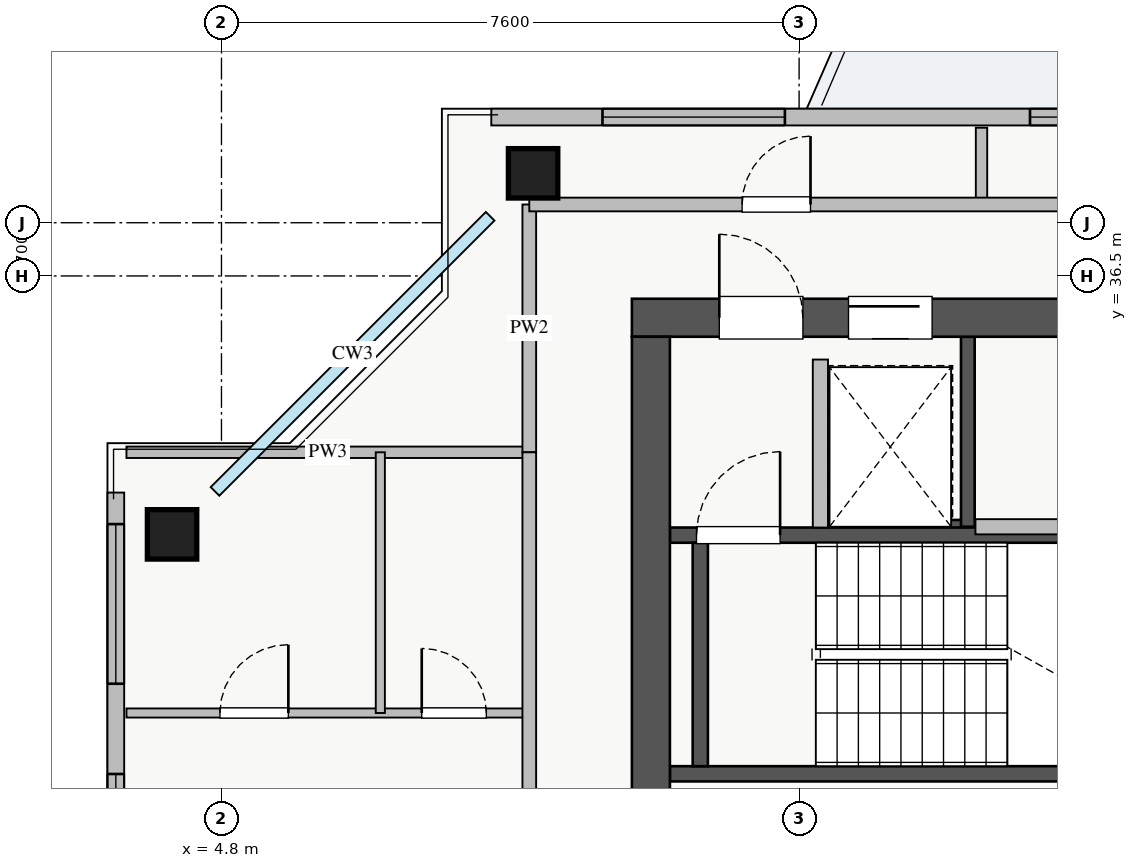
"""IFC4 building model, lengths in metres.
Left out: names, types, materials, properties, quantities, classifications, styles, units other than length and angle.
Written with IfcOpenShell. Run it as: python <this file> out.ifc"""

import sys

from ifc_helpers import new_model, si_unit, direction, frame, frame_2d, origin, origin_2d, place, context, subcontext, project, spatial, rectangle, extrude, source, transform, mapped, element, fill, save


model = new_model("IFC4")
c1 = context("Model", 3, precision=1e-05, world=origin(), true_north=direction((0.0, 1.0)))
c2 = subcontext(c1, "Body", "Model", "MODEL_VIEW")
j1 = project(units=[si_unit("LENGTHUNIT", "METRE"), si_unit("PLANEANGLEUNIT", "RADIAN")], contexts=[c1])
p1 = place(None, origin())
s1 = spatial("IfcSite", under=j1, at=p1, CompositionType="ELEMENT")
p2 = place(p1, origin())
s2 = spatial("IfcBuilding", under=s1, at=p2, CompositionType="ELEMENT")
p3 = place(p2, frame((0.0, 0.0, 256.75)))
s3 = spatial("IfcBuildingStorey", under=s2, at=p3, CompositionType="ELEMENT", Elevation=256.75)
p4 = place(p3, frame((12.68, 33.2, 0.0), z_axis=(0.0, 0.0, 1.0), x_axis=(1.0, 0.0, 0.0)))
e1 = element("IfcWall", 1, at=p4, inside=s3, PredefinedType="SHEAR", context=c2, shape_type="SweptSolid", body=[
    extrude(rectangle(XDim=1.94, YDim=0.18, at=frame_2d((0.97, 0.0))), origin(), (0.0, 0.0, 1.0), 3.07),
])
p5 = place(p3, frame((14.62, 33.2, 0.0), z_axis=(0.0, 0.0, 1.0), x_axis=(0.0, 1.0, 0.0)))
e2 = element("IfcWall", 2, at=p5, inside=s3, PredefinedType="SHEAR", context=c2, shape_type="SweptSolid", body=[
    extrude(rectangle(XDim=2.5, YDim=0.18, at=frame_2d((1.25, 0.0))), origin(), (0.0, 0.0, 1.0), 3.07),
])
p6 = place(p3, frame((10.7, 29.95, 0.0), z_axis=(0.0, 0.0, 1.0), x_axis=(1.0, 0.0, 0.0)))
e3 = element("IfcWall", 3, at=p6, inside=s3, PredefinedType="SHEAR", context=c2, shape_type="SweptSolid", body=[
    extrude(rectangle(XDim=7.45, YDim=0.2, at=frame_2d((3.725, 0.0))), origin(), (0.0, 0.0, 1.0), 3.25),
])
p7 = place(p3, frame((10.7, 33.09, 0.0), z_axis=(0.0, 0.0, 1.0), x_axis=(1.0, 0.0, 0.0)))
e4 = element("IfcWall", 4, at=p7, inside=s3, PredefinedType="SHEAR", context=c2, shape_type="SweptSolid", body=[
    extrude(rectangle(XDim=7.45, YDim=0.2, at=frame_2d((3.725, 0.0))), origin(), (0.0, 0.0, 1.0), 3.25),
])
p8 = place(p7, frame((0.35, 0.0, 0.0)))
e5 = element("IfcOpeningElement", 5, at=p8, cuts=e4, PredefinedType="OPENING", context=c2, shape_type="SweptSolid", body=[
    extrude(rectangle(XDim=1.1, YDim=2.05, at=frame_2d((0.55, 1.025))), frame((0.0, 0.11, 0.0), z_axis=(0.0, -1.0, 0.0), x_axis=(1.0, 0.0, 0.0)), (0.0, 0.0, 1.0), 0.22),
])
p9 = place(p3, frame((11.1, 30.05, 0.0), z_axis=(0.0, 0.0, 1.0), x_axis=(0.0, 1.0, 0.0)))
e6 = element("IfcWall", 6, at=p9, inside=s3, PredefinedType="SHEAR", context=c2, shape_type="SweptSolid", body=[
    extrude(rectangle(XDim=2.94, YDim=0.2, at=frame_2d((1.47, 0.0))), origin(), (0.0, 0.0, 1.0), 3.25),
])
p10 = place(p3, frame((10.2, 35.95, 0.0), z_axis=(0.0, 0.0, 1.0), x_axis=(1.0, 0.0, 0.0)))
e7 = element("IfcWall", 7, at=p10, inside=s3, PredefinedType="SHEAR", context=c2, shape_type="SweptSolid", body=[
    extrude(rectangle(XDim=17.6, YDim=0.5, at=frame_2d((8.8, 0.0))), origin(), (0.0, 0.0, 1.0), 3.25),
])
p11 = place(p10, frame((1.15, 0.0, 0.0)))
e8 = element("IfcOpeningElement", 8, at=p11, cuts=e7, PredefinedType="OPENING", context=c2, shape_type="SweptSolid", body=[
    extrude(rectangle(XDim=1.1, YDim=2.05, at=frame_2d((0.55, 1.025))), frame((0.0, 0.26, 0.0), z_axis=(0.0, -1.0, 0.0), x_axis=(1.0, 0.0, 0.0)), (0.0, 0.0, 1.0), 0.52),
])
p12 = place(p10, frame((8.3, 0.0, 0.0)))
e9 = element("IfcOpeningElement", 9, at=p12, cuts=e7, PredefinedType="OPENING", context=c2, shape_type="SweptSolid", body=[
    extrude(rectangle(XDim=1.1, YDim=2.05, at=frame_2d((0.55, 1.025))), frame((0.0, 0.26, 0.0), z_axis=(0.0, -1.0, 0.0), x_axis=(1.0, 0.0, 0.0)), (0.0, 0.0, 1.0), 0.52),
])
p13 = place(p10, frame((2.85, 0.0, 0.0)))
e10 = element("IfcOpeningElement", 10, at=p13, cuts=e7, PredefinedType="OPENING", context=c2, shape_type="SweptSolid", body=[
    extrude(rectangle(XDim=1.1, YDim=2.05, at=frame_2d((0.55, 1.025))), frame((0.0, 0.26, 0.0), z_axis=(0.0, -1.0, 0.0), x_axis=(1.0, 0.0, 0.0)), (0.0, 0.0, 1.0), 0.52),
])
p14 = place(p10, frame((5.8, 0.0, 0.0)))
e11 = element("IfcOpeningElement", 11, at=p14, cuts=e7, PredefinedType="OPENING", context=c2, shape_type="SweptSolid", body=[
    extrude(rectangle(XDim=1.0, YDim=2.05, at=frame_2d((0.5, 1.025))), frame((0.0, 0.26, 0.0), z_axis=(0.0, -1.0, 0.0), x_axis=(1.0, 0.0, 0.0)), (0.0, 0.0, 1.0), 0.52),
])
p15 = place(p10, frame((14.74, 0.0, 0.0)))
e12 = element("IfcOpeningElement", 12, at=p15, cuts=e7, PredefinedType="OPENING", context=c2, shape_type="SweptSolid", body=[
    extrude(rectangle(XDim=1.0, YDim=2.05, at=frame_2d((0.5, 1.025))), frame((0.0, 0.26, 0.0), z_axis=(0.0, -1.0, 0.0), x_axis=(1.0, 0.0, 0.0)), (0.0, 0.0, 1.0), 0.52),
])
p16 = place(p10, frame((10.175, 0.0, 0.0)))
e13 = element("IfcOpeningElement", 13, at=p16, cuts=e7, PredefinedType="OPENING", context=c2, shape_type="SweptSolid", body=[
    extrude(rectangle(XDim=1.0, YDim=2.05, at=frame_2d((0.5, 1.025))), frame((0.0, 0.26, 0.0), z_axis=(0.0, -1.0, 0.0), x_axis=(1.0, 0.0, 0.0)), (0.0, 0.0, 1.0), 0.52),
])
p17 = place(p10, frame((12.625, 0.0, 0.0)))
e14 = element("IfcOpeningElement", 14, at=p17, cuts=e7, PredefinedType="OPENING", context=c2, shape_type="SweptSolid", body=[
    extrude(rectangle(XDim=1.0, YDim=2.05, at=frame_2d((0.5, 1.025))), frame((0.0, 0.26, 0.0), z_axis=(0.0, -1.0, 0.0), x_axis=(1.0, 0.0, 0.0)), (0.0, 0.0, 1.0), 0.52),
])
p18 = place(p3, frame((10.45, 29.5, 0.0), z_axis=(0.0, 0.0, 1.0), x_axis=(0.0, 1.0, 0.0)))
e15 = element("IfcWall", 15, at=p18, inside=s3, PredefinedType="SHEAR", context=c2, shape_type="SweptSolid", body=[
    extrude(rectangle(XDim=6.2, YDim=0.5, at=frame_2d((3.1, 0.0))), origin(), (0.0, 0.0, 1.0), 3.25),
])
m1 = source(origin(), c2, "Body", "SweptSolid", [
    extrude(rectangle(XDim=0.65, YDim=0.65, at=origin_2d()), origin(), (0.0, 0.0, 1.0), 3.25),
])
for number, where, z_axis, x_axis in (
    (16, (8.9, 37.85, 0.0), (0.0, 0.0, 1.0), (1.0, 0.0, 0.0)),
    (17, (4.15, 33.1, 0.0), (0.0, 0.0, 1.0), (1.0, 0.0, 0.0)),
):
    element("IfcColumn", number, at=place(p3, frame(where, z_axis=z_axis, x_axis=x_axis)), inside=s3, PredefinedType="COLUMN", context=c2, shape_type="MappedRepresentation", body=[
        mapped(m1, transform((0.0, 0.0, 0.0), x_axis=(1.0, 0.0, 0.0), y_axis=(0.0, 1.0, 0.0), z_axis=(0.0, 0.0, 1.0), scale=1.0)),
    ])
p19 = place(p3, frame((8.35, 38.59, 0.0), z_axis=(0.0, 0.0, 1.0), x_axis=(1.0, 0.0, 0.0)))
e18 = element("IfcWall", 18, at=p19, inside=s3, PredefinedType="STANDARD", context=c2, shape_type="SweptSolid", body=[
    extrude(rectangle(XDim=21.3, YDim=0.22, at=frame_2d((10.65, 0.0))), origin(), (0.0, 0.0, 1.0), 2.61),
])
p20 = place(p19, frame((11.5, 0.0, 0.0)))
e19 = element("IfcOpeningElement", 19, at=p20, cuts=e18, PredefinedType="OPENING", context=c2, shape_type="SweptSolid", body=[
    extrude(rectangle(XDim=1.2, YDim=2.1, at=frame_2d((0.6, 1.05))), frame((0.0, 0.12, 0.0), z_axis=(0.0, -1.0, 0.0), x_axis=(1.0, 0.0, 0.0)), (0.0, 0.0, 1.0), 0.24),
])
p21 = place(p19, frame((1.463, 0.0, 0.9)))
e20 = element("IfcOpeningElement", 20, at=p21, cuts=e18, PredefinedType="OPENING", context=c2, shape_type="SweptSolid", body=[
    extrude(rectangle(XDim=2.4, YDim=1.48, at=frame_2d((1.2, 0.74))), frame((0.0, 0.12, 0.0), z_axis=(0.0, -1.0, 0.0), x_axis=(1.0, 0.0, 0.0)), (0.0, 0.0, 1.0), 0.24),
])
p22 = place(p19, frame((7.088, 0.0, 0.9)))
e21 = element("IfcOpeningElement", 21, at=p22, cuts=e18, PredefinedType="OPENING", context=c2, shape_type="SweptSolid", body=[
    extrude(rectangle(XDim=1.8, YDim=1.45, at=frame_2d((0.9, 0.725))), frame((0.0, 0.12, 0.0), z_axis=(0.0, -1.0, 0.0), x_axis=(1.0, 0.0, 0.0)), (0.0, 0.0, 1.0), 0.24),
])
p23 = place(p19, frame((19.775, 0.0, 0.9)))
e22 = element("IfcOpeningElement", 22, at=p23, cuts=e18, PredefinedType="OPENING", context=c2, shape_type="SweptSolid", body=[
    extrude(rectangle(XDim=1.2, YDim=1.4, at=frame_2d((0.6, 0.7))), frame((0.0, 0.12, 0.0), z_axis=(0.0, -1.0, 0.0), x_axis=(1.0, 0.0, 0.0)), (0.0, 0.0, 1.0), 0.24),
])
p24 = place(p19, frame((15.042, 0.0, 0.9)))
e23 = element("IfcOpeningElement", 23, at=p24, cuts=e18, PredefinedType="OPENING", context=c2, shape_type="SweptSolid", body=[
    extrude(rectangle(XDim=2.4, YDim=1.5, at=frame_2d((1.2, 0.75))), frame((0.0, 0.12, 0.0), z_axis=(0.0, -1.0, 0.0), x_axis=(1.0, 0.0, 0.0)), (0.0, 0.0, 1.0), 0.24),
])
p25 = place(p3, frame((3.41, 12.35, 0.0), z_axis=(0.0, 0.0, 1.0), x_axis=(0.0, 1.0, 0.0)))
e24 = element("IfcWall", 24, at=p25, inside=s3, PredefinedType="STANDARD", context=c2, shape_type="SweptSolid", body=[
    extrude(rectangle(XDim=21.3, YDim=0.22, at=frame_2d((10.65, 0.0))), origin(), (0.0, 0.0, 1.0), 2.61),
])
p26 = place(p25, frame((11.5, 0.0, 0.0)))
e25 = element("IfcOpeningElement", 25, at=p26, cuts=e24, PredefinedType="OPENING", context=c2, shape_type="SweptSolid", body=[
    extrude(rectangle(XDim=1.2, YDim=2.1, at=frame_2d((0.6, 1.05))), frame((0.0, 0.12, 0.0), z_axis=(0.0, -1.0, 0.0), x_axis=(1.0, 0.0, 0.0)), (0.0, 0.0, 1.0), 0.24),
])
p27 = place(p25, frame((0.44, 0.0, 0.9)))
e26 = element("IfcOpeningElement", 26, at=p27, cuts=e24, PredefinedType="OPENING", context=c2, shape_type="SweptSolid", body=[
    extrude(rectangle(XDim=2.4, YDim=1.5, at=frame_2d((1.2, 0.75))), frame((0.0, 0.12, 0.0), z_axis=(0.0, -1.0, 0.0), x_axis=(1.0, 0.0, 0.0)), (0.0, 0.0, 1.0), 0.24),
])
p28 = place(p25, frame((18.785, 0.0, 0.9)))
e27 = element("IfcOpeningElement", 27, at=p28, cuts=e24, PredefinedType="OPENING", context=c2, shape_type="SweptSolid", body=[
    extrude(rectangle(XDim=2.1, YDim=1.5, at=frame_2d((1.05, 0.75))), frame((0.0, 0.12, 0.0), z_axis=(0.0, -1.0, 0.0), x_axis=(1.0, 0.0, 0.0)), (0.0, 0.0, 1.0), 0.24),
])
p29 = place(p25, frame((3.653, 0.0, 0.9)))
e28 = element("IfcOpeningElement", 28, at=p29, cuts=e24, PredefinedType="OPENING", context=c2, shape_type="SweptSolid", body=[
    extrude(rectangle(XDim=2.4, YDim=1.5, at=frame_2d((1.2, 0.75))), frame((0.0, 0.12, 0.0), z_axis=(0.0, -1.0, 0.0), x_axis=(1.0, 0.0, 0.0)), (0.0, 0.0, 1.0), 0.24),
])
p30 = place(p25, frame((15.198, 0.0, 0.9)))
e29 = element("IfcOpeningElement", 29, at=p30, cuts=e24, PredefinedType="OPENING", context=c2, shape_type="SweptSolid", body=[
    extrude(rectangle(XDim=2.4, YDim=1.5, at=frame_2d((1.2, 0.75))), frame((0.0, 0.12, 0.0), z_axis=(0.0, -1.0, 0.0), x_axis=(1.0, 0.0, 0.0)), (0.0, 0.0, 1.0), 0.24),
])
p31 = place(p25, frame((6.705, 0.0, 0.9)))
e30 = element("IfcOpeningElement", 30, at=p31, cuts=e24, PredefinedType="OPENING", context=c2, shape_type="SweptSolid", body=[
    extrude(rectangle(XDim=0.9, YDim=1.2, at=frame_2d((0.45, 0.6))), frame((0.0, 0.12, 0.0), z_axis=(0.0, -1.0, 0.0), x_axis=(1.0, 0.0, 0.0)), (0.0, 0.0, 1.0), 0.24),
])
p32 = place(p3, frame((12.68, 33.19, 0.0), z_axis=(0.0, 0.0, 1.0), x_axis=(0.0, 1.0, 0.0)))
e31 = element("IfcWall", 31, at=p32, inside=s3, PredefinedType="PARTITIONING", context=c2, shape_type="SweptSolid", body=[
    extrude(rectangle(XDim=2.21, YDim=0.2, at=frame_2d((1.105, 0.0))), origin(), (0.0, 0.0, 1.0), 3.07),
])
p33 = place(p3, frame((14.72, 33.2, 0.0), z_axis=(0.0, 0.0, 1.0), x_axis=(1.0, 0.0, 0.0)))
e32 = element("IfcWall", 32, at=p33, inside=s3, PredefinedType="PARTITIONING", context=c2, shape_type="SweptSolid", body=[
    extrude(rectangle(XDim=3.28, YDim=0.2, at=frame_2d((1.64, 0.0))), origin(), (0.0, 0.0, 1.0), 3.07),
])
p34 = place(p3, frame((3.55, 34.18, 0.0), z_axis=(0.0, 0.0, 1.0), x_axis=(1.0, 0.0, 0.0)))
e33 = element("IfcWall", 33, at=p34, inside=s3, PredefinedType="PARTITIONING", context=c2, shape_type="SweptSolid", body=[
    extrude(rectangle(XDim=5.3, YDim=0.15, at=frame_2d((2.65, 0.0))), origin(), (0.0, 0.0, 1.0), 3.07),
])
p35 = place(p3, frame((8.85, 34.18, 0.0), z_axis=(0.0, 0.0, 1.0), x_axis=(0.0, 1.0, 0.0)))
e34 = element("IfcWall", 34, at=p35, inside=s3, PredefinedType="PARTITIONING", context=c2, shape_type="SweptSolid", body=[
    extrude(rectangle(XDim=3.26, YDim=0.18, at=frame_2d((1.63, 0.0))), origin(), (0.0, 0.0, 1.0), 2.569),
])
p36 = place(p3, frame((14.8, 37.44, 0.0), z_axis=(0.0, 0.0, 1.0), x_axis=(0.0, 1.0, 0.0)))
e35 = element("IfcWall", 35, at=p36, inside=s3, PredefinedType="PARTITIONING", context=c2, shape_type="SweptSolid", body=[
    extrude(rectangle(XDim=1.01, YDim=0.15, at=frame_2d((0.505, 0.0))), origin(), (0.0, 0.0, 1.0), 3.07),
])
p37 = place(p3, frame((8.85, 37.44, 0.0), z_axis=(0.0, 0.0, 1.0), x_axis=(1.0, 0.0, 0.0)))
e36 = element("IfcWall", 36, at=p37, inside=s3, PredefinedType="PARTITIONING", context=c2, shape_type="SweptSolid", body=[
    extrude(rectangle(XDim=18.95, YDim=0.18, at=frame_2d((9.475, 0.0))), origin(), (0.0, 0.0, 1.0), 3.07),
])
p38 = place(p37, frame((2.8, 0.0, 0.0)))
e37 = element("IfcOpeningElement", 37, at=p38, cuts=e36, PredefinedType="OPENING", context=c2, shape_type="SweptSolid", body=[
    extrude(rectangle(XDim=0.9, YDim=2.05, at=frame_2d((0.45, 1.025))), frame((0.0, 0.1, 0.0), z_axis=(0.0, -1.0, 0.0), x_axis=(1.0, 0.0, 0.0)), (0.0, 0.0, 1.0), 0.2),
])
p39 = place(p37, frame((8.8, 0.0, 0.0)))
e38 = element("IfcOpeningElement", 38, at=p39, cuts=e36, PredefinedType="OPENING", context=c2, shape_type="SweptSolid", body=[
    extrude(rectangle(XDim=0.9, YDim=2.05, at=frame_2d((0.45, 1.025))), frame((0.0, 0.1, 0.0), z_axis=(0.0, -1.0, 0.0), x_axis=(1.0, 0.0, 0.0)), (0.0, 0.0, 1.0), 0.2),
])
p40 = place(p37, frame((15.2, 0.0, 0.0)))
e39 = element("IfcOpeningElement", 39, at=p40, cuts=e36, PredefinedType="OPENING", context=c2, shape_type="SweptSolid", body=[
    extrude(rectangle(XDim=0.9, YDim=2.05, at=frame_2d((0.45, 1.025))), frame((0.0, 0.1, 0.0), z_axis=(0.0, -1.0, 0.0), x_axis=(1.0, 0.0, 0.0)), (0.0, 0.0, 1.0), 0.2),
])
p41 = place(p3, frame((3.55, 30.75, 0.0), z_axis=(0.0, 0.0, 1.0), x_axis=(1.0, 0.0, 0.0)))
e40 = element("IfcWall", 40, at=p41, inside=s3, PredefinedType="PLUMBINGWALL", context=c2, shape_type="SweptSolid", body=[
    extrude(rectangle(XDim=5.3, YDim=0.12, at=frame_2d((2.65, 0.0))), origin(), (0.0, 0.0, 1.0), 3.07),
])
p42 = place(p41, frame((1.23, 0.0, 0.0)))
e41 = element("IfcOpeningElement", 41, at=p42, cuts=e40, PredefinedType="OPENING", context=c2, shape_type="SweptSolid", body=[
    extrude(rectangle(XDim=0.9, YDim=2.05, at=frame_2d((0.45, 1.025))), frame((0.0, 0.07, 0.0), z_axis=(0.0, -1.0, 0.0), x_axis=(1.0, 0.0, 0.0)), (0.0, 0.0, 1.0), 0.14),
])
p43 = place(p41, frame((3.885, 0.0, 0.0)))
e42 = element("IfcOpeningElement", 42, at=p43, cuts=e40, PredefinedType="OPENING", context=c2, shape_type="SweptSolid", body=[
    extrude(rectangle(XDim=0.85, YDim=2.05, at=frame_2d((0.425, 1.025))), frame((0.0, 0.07, 0.0), z_axis=(0.0, -1.0, 0.0), x_axis=(1.0, 0.0, 0.0)), (0.0, 0.0, 1.0), 0.14),
])
p44 = place(p3, frame((6.89, 30.75, 0.0), z_axis=(0.0, 0.0, 1.0), x_axis=(0.0, 1.0, 0.0)))
e43 = element("IfcWall", 43, at=p44, inside=s3, PredefinedType="PLUMBINGWALL", context=c2, shape_type="SweptSolid", body=[
    extrude(rectangle(XDim=3.43, YDim=0.12, at=frame_2d((1.715, 0.0))), origin(), (0.0, 0.0, 1.0), 3.07),
])
p45 = place(p3, frame((8.85, 11.82, 0.0), z_axis=(0.0, 0.0, 1.0), x_axis=(0.0, 1.0, 0.0)))
e44 = element("IfcWall", 44, at=p45, inside=s3, PredefinedType="PARTITIONING", context=c2, shape_type="SweptSolid", body=[
    extrude(rectangle(XDim=22.36, YDim=0.18, at=frame_2d((11.18, 0.0))), origin(), (0.0, 0.0, 1.0), 2.569),
])
p46 = place(p45, frame((1.2, 0.0, 0.0)))
e45 = element("IfcOpeningElement", 45, at=p46, cuts=e44, PredefinedType="OPENING", context=c2, shape_type="SweptSolid", body=[
    extrude(rectangle(XDim=1.0, YDim=2.05, at=frame_2d((0.5, 1.025))), frame((0.0, 0.1, 0.0), z_axis=(0.0, -1.0, 0.0), x_axis=(1.0, 0.0, 0.0)), (0.0, 0.0, 1.0), 0.2),
])
p47 = place(p45, frame((8.445, 0.0, 0.0)))
e46 = element("IfcOpeningElement", 46, at=p47, cuts=e44, PredefinedType="OPENING", context=c2, shape_type="SweptSolid", body=[
    extrude(rectangle(XDim=1.0, YDim=2.05, at=frame_2d((0.5, 1.025))), frame((0.0, 0.1, 0.0), z_axis=(0.0, -1.0, 0.0), x_axis=(1.0, 0.0, 0.0)), (0.0, 0.0, 1.0), 0.2),
])
p48 = place(p45, frame((16.23, 0.0, 0.0)))
e47 = element("IfcOpeningElement", 47, at=p48, cuts=e44, PredefinedType="OPENING", context=c2, shape_type="SweptSolid", body=[
    extrude(rectangle(XDim=1.0, YDim=2.05, at=frame_2d((0.5, 1.025))), frame((0.0, 0.1, 0.0), z_axis=(0.0, -1.0, 0.0), x_axis=(1.0, 0.0, 0.0)), (0.0, 0.0, 1.0), 0.2),
])
m2 = source(origin(), c2, "Body", "SweptSolid", [
    extrude(rectangle(XDim=2.4, YDim=1.48, at=frame_2d((1.2, 0.74))), frame((0.0, 0.03, 0.0), z_axis=(0.0, -1.0, 0.0), x_axis=(1.0, 0.0, 0.0)), (0.0, 0.0, 1.0), 0.06),
])
p49 = place(p21, origin())
e48 = element("IfcWindow", 48, at=p49, inside=s3, PartitioningType="TRIPLE_PANEL_VERTICAL", PredefinedType="WINDOW", context=c2, shape_type="MappedRepresentation", body=[
    mapped(m2, transform((0.0, 0.0, 0.0), x_axis=(1.0, 0.0, 0.0), y_axis=(0.0, 1.0, 0.0), z_axis=(0.0, 0.0, 1.0), scale=1.0)),
])
fill(e20, e48)
m3 = source(origin(), c2, "Body", "SweptSolid", [
    extrude(rectangle(XDim=1.8, YDim=1.45, at=frame_2d((0.9, 0.725))), frame((0.0, 0.03, 0.0), z_axis=(0.0, -1.0, 0.0), x_axis=(1.0, 0.0, 0.0)), (0.0, 0.0, 1.0), 0.06),
])
p50 = place(p22, origin())
e49 = element("IfcWindow", 49, at=p50, inside=s3, PartitioningType="DOUBLE_PANEL_VERTICAL", PredefinedType="WINDOW", context=c2, shape_type="MappedRepresentation", body=[
    mapped(m3, transform((0.0, 0.0, 0.0), x_axis=(1.0, 0.0, 0.0), y_axis=(0.0, 1.0, 0.0), z_axis=(0.0, 0.0, 1.0), scale=1.0)),
])
fill(e21, e49)
m4 = source(origin(), c2, "Body", "SweptSolid", [
    extrude(rectangle(XDim=2.1, YDim=1.5, at=frame_2d((1.05, 0.75))), frame((0.0, 0.03, 0.0), z_axis=(0.0, -1.0, 0.0), x_axis=(1.0, 0.0, 0.0)), (0.0, 0.0, 1.0), 0.06),
])
p51 = place(p28, origin())
e50 = element("IfcWindow", 50, at=p51, inside=s3, PartitioningType="TRIPLE_PANEL_VERTICAL", PredefinedType="WINDOW", context=c2, shape_type="MappedRepresentation", body=[
    mapped(m4, transform((0.0, 0.0, 0.0), x_axis=(1.0, 0.0, 0.0), y_axis=(0.0, 1.0, 0.0), z_axis=(0.0, 0.0, 1.0), scale=1.0)),
])
fill(e27, e50)
m5 = source(origin(), c2, "Body", "SweptSolid", [
    extrude(rectangle(XDim=1.1, YDim=2.05, at=frame_2d((0.55, 1.025))), frame((0.0, 0.025, 0.0), z_axis=(0.0, -1.0, 0.0), x_axis=(1.0, 0.0, 0.0)), (0.0, 0.0, 1.0), 0.05),
])
p52 = place(p11, origin())
e51 = element("IfcDoor", 51, at=p52, inside=s3, OperationType="SINGLE_SWING_LEFT", PredefinedType="DOOR", context=c2, shape_type="MappedRepresentation", body=[
    mapped(m5, transform((0.0, 0.0, 0.0), x_axis=(1.0, 0.0, 0.0), y_axis=(0.0, 1.0, 0.0), z_axis=(0.0, 0.0, 1.0), scale=1.0)),
])
fill(e8, e51)
p53 = place(p8, origin())
e52 = element("IfcDoor", 52, at=p53, inside=s3, OperationType="SINGLE_SWING_RIGHT", PredefinedType="DOOR", context=c2, shape_type="MappedRepresentation", body=[
    mapped(m5, transform((0.0, 0.0, 0.0), x_axis=(1.0, 0.0, 0.0), y_axis=(0.0, 1.0, 0.0), z_axis=(0.0, 0.0, 1.0), scale=1.0)),
])
fill(e5, e52)
p54 = place(p13, origin())
e53 = element("IfcDoor", 53, at=p54, inside=s3, OperationType="SLIDING_TO_LEFT", PredefinedType="DOOR", context=c2, shape_type="MappedRepresentation", body=[
    mapped(m5, transform((0.0, 0.0, 0.0), x_axis=(1.0, 0.0, 0.0), y_axis=(0.0, 1.0, 0.0), z_axis=(0.0, 0.0, 1.0), scale=1.0)),
])
fill(e10, e53)
m6 = source(origin(), c2, "Body", "SweptSolid", [
    extrude(rectangle(XDim=0.9, YDim=2.05, at=frame_2d((0.45, 1.025))), frame((0.0, 0.025, 0.0), z_axis=(0.0, -1.0, 0.0), x_axis=(1.0, 0.0, 0.0)), (0.0, 0.0, 1.0), 0.05),
])
p55 = place(p38, origin())
e54 = element("IfcDoor", 54, at=p55, inside=s3, OperationType="SINGLE_SWING_RIGHT", PredefinedType="DOOR", context=c2, shape_type="MappedRepresentation", body=[
    mapped(m6, transform((0.0, 0.0, 0.0), x_axis=(1.0, 0.0, 0.0), y_axis=(0.0, 1.0, 0.0), z_axis=(0.0, 0.0, 1.0), scale=1.0)),
])
fill(e37, e54)
p56 = place(p42, origin())
e55 = element("IfcDoor", 55, at=p56, inside=s3, OperationType="SINGLE_SWING_RIGHT", PredefinedType="DOOR", context=c2, shape_type="MappedRepresentation", body=[
    mapped(m6, transform((0.0, 0.0, 0.0), x_axis=(1.0, 0.0, 0.0), y_axis=(0.0, 1.0, 0.0), z_axis=(0.0, 0.0, 1.0), scale=1.0)),
])
fill(e41, e55)
m7 = source(origin(), c2, "Body", "SweptSolid", [
    extrude(rectangle(XDim=0.85, YDim=2.05, at=frame_2d((0.425, 1.025))), frame((0.0, 0.025, 0.0), z_axis=(0.0, -1.0, 0.0), x_axis=(1.0, 0.0, 0.0)), (0.0, 0.0, 1.0), 0.05),
])
p57 = place(p43, origin())
e56 = element("IfcDoor", 56, at=p57, inside=s3, OperationType="SINGLE_SWING_LEFT", PredefinedType="DOOR", context=c2, shape_type="MappedRepresentation", body=[
    mapped(m7, transform((0.0, 0.0, 0.0), x_axis=(1.0, 0.0, 0.0), y_axis=(0.0, 1.0, 0.0), z_axis=(0.0, 0.0, 1.0), scale=1.0)),
])
fill(e42, e56)
m8 = source(origin(), c2, "Body", "SweptSolid", [
    extrude(rectangle(XDim=2.4, YDim=1.5, at=frame_2d((1.2, 0.75))), frame((0.0, 0.03, 0.0), z_axis=(0.0, -1.0, 0.0), x_axis=(1.0, 0.0, 0.0)), (0.0, 0.0, 1.0), 0.06),
])
p58 = place(p30, origin())
e57 = element("IfcWindow", 57, at=p58, inside=s3, PartitioningType="TRIPLE_PANEL_VERTICAL", PredefinedType="WINDOW", context=c2, shape_type="MappedRepresentation", body=[
    mapped(m8, transform((0.0, 0.0, 0.0), x_axis=(1.0, 0.0, 0.0), y_axis=(0.0, 1.0, 0.0), z_axis=(0.0, 0.0, 1.0), scale=1.0)),
])
fill(e29, e57)
save(model, sys.argv[1])
